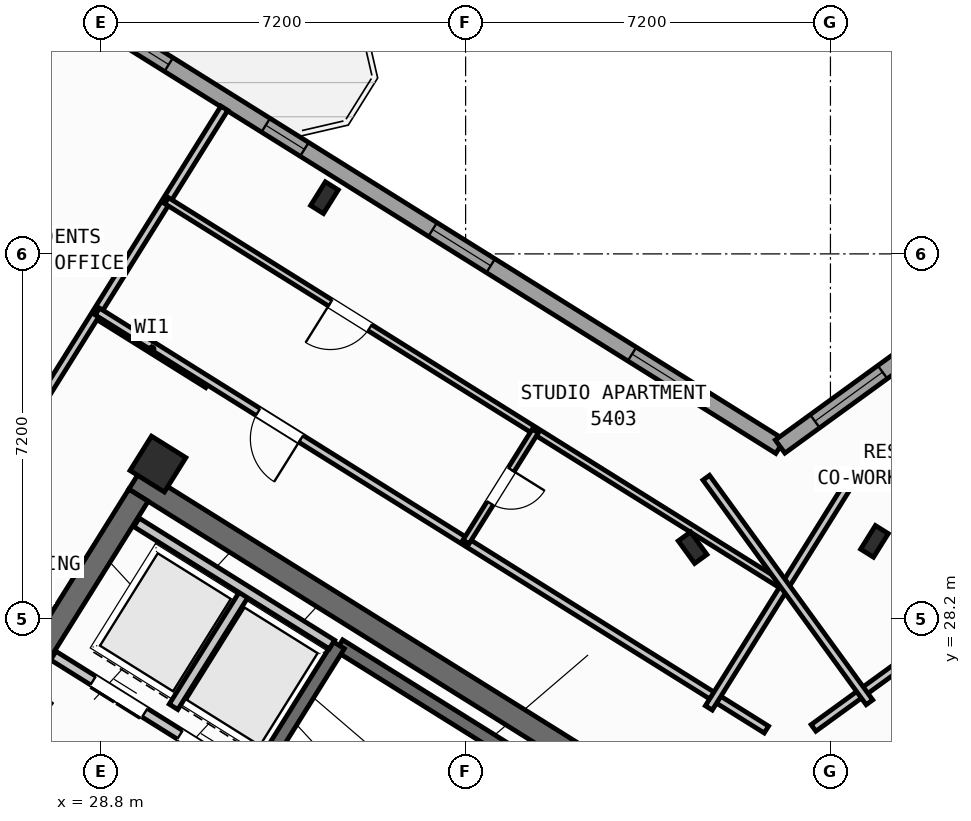
"""IFC4 building model, lengths in metres.
Left out: names, types, materials, properties, quantities, classifications, styles, units other than length and angle.
Written with IfcOpenShell. Run it as: python <this file> out.ifc"""

import sys

from ifc_helpers import new_model, si_unit, direction, frame, frame_2d, origin, origin_2d, place, context, subcontext, project, spatial, rectangle, hollow_rectangle, i_section, extrude, source, transform, mapped, element, fill, save


model = new_model("IFC4")
c1 = context("Model", 3, precision=1e-05, world=origin(), true_north=direction((0.0, 1.0)))
c2 = subcontext(c1, "Body", "Model", "MODEL_VIEW")
j1 = project(units=[si_unit("LENGTHUNIT", "METRE"), si_unit("PLANEANGLEUNIT", "RADIAN")], contexts=[c1])
p1 = place(None, origin())
s1 = spatial("IfcSite", under=j1, at=p1, CompositionType="ELEMENT")
p2 = place(p1, origin())
s2 = spatial("IfcBuilding", under=s1, at=p2, CompositionType="ELEMENT")
p3 = place(p2, frame((0.0, 0.0, 214.8)))
s3 = spatial("IfcBuildingStorey", under=s2, at=p3, CompositionType="ELEMENT", Elevation=214.8)
p4 = place(p3, frame((40.531, 24.036, 0.0), z_axis=(0.0, 0.0, 1.0), x_axis=(-0.848048787466, 0.529918157905, 0.0)))
e1 = element("IfcWall", 1, at=p4, inside=s3, PredefinedType="SHEAR", context=c2, shape_type="SweptSolid", body=[
    extrude(rectangle(XDim=13.04, YDim=0.45, at=frame_2d((6.52, 0.0))), origin(), (0.0, 0.0, 1.0), 3.35),
])
p5 = place(p3, frame((29.544, 30.636, 0.0), z_axis=(0.0, 0.0, 1.0), x_axis=(-0.529902075036, -0.848058836916, 0.0)))
e2 = element("IfcWall", 2, at=p5, inside=s3, PredefinedType="SHEAR", context=c2, shape_type="SweptSolid", body=[
    extrude(rectangle(XDim=3.625, YDim=0.45, at=frame_2d((1.812, 0.0))), origin(), (0.0, 0.0, 1.0), 3.35),
])
p6 = place(p3, frame((44.406, 24.172, 0.0), z_axis=(0.0, 0.0, 1.0), x_axis=(0.809012867805, 0.587790931986, 0.0)))
e3 = element("IfcWall", 3, at=p6, inside=s3, PredefinedType="SHEAR", context=c2, shape_type="SweptSolid", body=[
    extrude(rectangle(XDim=12.24, YDim=0.45, at=frame_2d((6.12, 0.0))), origin(), (0.0, 0.0, 1.0), 3.35),
])
m1 = source(origin(), c2, "Body", "SweptSolid", [
    extrude(i_section(OverallWidth=0.3, OverallDepth=0.55, WebThickness=0.015, FlangeThickness=0.029, at=origin_2d()), origin(), (0.0, 0.0, 1.0), 3.6),
])
for number, where, z_axis, x_axis in (
    (4, (44.068, 29.726, 0.0), (0.0, 0.0, 1.0), (-0.848, 0.53, 0.0)),
    (5, (33.213, 36.509, 0.0), (0.0, 0.0, 1.0), (-0.848, 0.53, 0.0)),
):
    element("IfcColumn", number, at=place(p3, frame(where, z_axis=z_axis, x_axis=x_axis)), inside=s3, PredefinedType="COLUMN", context=c2, shape_type="MappedRepresentation", body=[
        mapped(m1, transform((0.0, 0.0, 0.0), scale=1.0)),
    ])
m2 = source(origin(), c2, "Body", "SweptSolid", [
    extrude(hollow_rectangle(XDim=0.8, YDim=0.8, WallThickness=0.032, at=origin_2d()), origin(), (0.0, 0.0, 1.0), 3.6),
])
p7 = place(p3, frame((29.928, 31.251, 0.0), z_axis=(0.0, 0.0, 1.0), x_axis=(-0.848048096156, 0.529919264233, 0.0)))
e6 = element("IfcColumn", 6, at=p7, inside=s3, PredefinedType="COLUMN", context=c2, shape_type="MappedRepresentation", body=[
    mapped(m2, transform((0.0, 0.0, 0.0), scale=1.0)),
])
p8 = place(p3, frame((40.479, 29.601, 0.0), z_axis=(0.0, 0.0, 1.0), x_axis=(0.809016994375, 0.587785252292, 0.0)))
e7 = element("IfcColumn", 7, at=p8, inside=s3, PredefinedType="COLUMN", context=c2, shape_type="MappedRepresentation", body=[
    mapped(m1, transform((0.0, 0.0, 0.0), scale=1.0)),
])
p9 = place(p3, frame((31.76, 12.183, 0.0), z_axis=(0.0, 0.0, 1.0), x_axis=(-0.848047074256, 0.529920899612, 0.0)))
e8 = element("IfcWall", 8, at=p9, inside=s3, PredefinedType="STANDARD", context=c2, shape_type="SweptSolid", body=[
    extrude(rectangle(XDim=30.652, YDim=0.32, at=frame_2d((15.326, 0.0))), origin(), (0.0, 0.0, 1.0), 3.35),
])
p10 = place(p9, frame((15.166, 0.0, 0.0)))
e9 = element("IfcOpeningElement", 9, at=p10, cuts=e8, PredefinedType="OPENING", context=c2, shape_type="SweptSolid", body=[
    extrude(rectangle(XDim=1.2, YDim=2.15, at=frame_2d((0.6, 1.075))), frame((0.0, 0.17, 0.0), z_axis=(0.0, -1.0, 0.0), x_axis=(1.0, 0.0, 0.0)), (0.0, 0.0, 1.0), 0.34),
])
p11 = place(p9, frame((2.24, 0.0, 0.9)))
e10 = element("IfcOpeningElement", 10, at=p11, cuts=e8, PredefinedType="OPENING", context=c2, shape_type="SweptSolid", body=[
    extrude(rectangle(XDim=1.65, YDim=1.45, at=frame_2d((0.825, 0.725))), frame((0.0, 0.17, 0.0), z_axis=(0.0, -1.0, 0.0), x_axis=(1.0, 0.0, 0.0)), (0.0, 0.0, 1.0), 0.34),
])
p12 = place(p9, frame((7.469, 0.0, 0.9)))
e11 = element("IfcOpeningElement", 11, at=p12, cuts=e8, PredefinedType="OPENING", context=c2, shape_type="SweptSolid", body=[
    extrude(rectangle(XDim=1.65, YDim=1.45, at=frame_2d((0.825, 0.725))), frame((0.0, 0.17, 0.0), z_axis=(0.0, -1.0, 0.0), x_axis=(1.0, 0.0, 0.0)), (0.0, 0.0, 1.0), 0.34),
])
p13 = place(p9, frame((12.623, 0.0, 1.0)))
e12 = element("IfcOpeningElement", 12, at=p13, cuts=e8, PredefinedType="OPENING", context=c2, shape_type="SweptSolid", body=[
    extrude(rectangle(XDim=0.9, YDim=1.25, at=frame_2d((0.45, 0.625))), frame((0.0, 0.17, 0.0), z_axis=(0.0, -1.0, 0.0), x_axis=(1.0, 0.0, 0.0)), (0.0, 0.0, 1.0), 0.34),
])
p14 = place(p9, frame((19.715, 0.0, 1.0)))
e13 = element("IfcOpeningElement", 13, at=p14, cuts=e8, PredefinedType="OPENING", context=c2, shape_type="SweptSolid", body=[
    extrude(rectangle(XDim=0.9, YDim=1.25, at=frame_2d((0.45, 0.625))), frame((0.0, 0.17, 0.0), z_axis=(0.0, -1.0, 0.0), x_axis=(1.0, 0.0, 0.0)), (0.0, 0.0, 1.0), 0.34),
])
p15 = place(p9, frame((25.566, 0.0, 0.9)))
e14 = element("IfcOpeningElement", 14, at=p15, cuts=e8, PredefinedType="OPENING", context=c2, shape_type="SweptSolid", body=[
    extrude(rectangle(XDim=1.65, YDim=1.45, at=frame_2d((0.825, 0.725))), frame((0.0, 0.17, 0.0), z_axis=(0.0, -1.0, 0.0), x_axis=(1.0, 0.0, 0.0)), (0.0, 0.0, 1.0), 0.34),
])
p16 = place(p9, frame((28.896, 0.0, 1.0)))
e15 = element("IfcOpeningElement", 15, at=p16, cuts=e8, PredefinedType="OPENING", context=c2, shape_type="SweptSolid", body=[
    extrude(rectangle(XDim=0.9, YDim=1.25, at=frame_2d((0.45, 0.625))), frame((0.0, 0.17, 0.0), z_axis=(0.0, -1.0, 0.0), x_axis=(1.0, 0.0, 0.0)), (0.0, 0.0, 1.0), 0.34),
])
p17 = place(p3, frame((17.424, 47.083, 0.0), z_axis=(0.0, 0.0, 1.0), x_axis=(0.848049927979, -0.529916332693, 0.0)))
e16 = element("IfcWall", 16, at=p17, inside=s3, PredefinedType="STANDARD", context=c2, shape_type="SweptSolid", body=[
    extrude(rectangle(XDim=29.223, YDim=0.32, at=frame_2d((14.612, 0.0))), origin(), (0.0, 0.0, 1.0), 3.35),
])
p18 = place(p17, frame((2.526, 0.0, 0.0)))
e17 = element("IfcOpeningElement", 17, at=p18, cuts=e16, PredefinedType="OPENING", context=c2, shape_type="SweptSolid", body=[
    extrude(rectangle(XDim=1.05, YDim=2.15, at=frame_2d((0.525, 1.075))), frame((0.0, 0.17, 0.0), z_axis=(0.0, -1.0, 0.0), x_axis=(1.0, 0.0, 0.0)), (0.0, 0.0, 1.0), 0.34),
])
p19 = place(p17, frame((0.653, 0.0, 0.9)))
e18 = element("IfcOpeningElement", 18, at=p19, cuts=e16, PredefinedType="OPENING", context=c2, shape_type="SweptSolid", body=[
    extrude(rectangle(XDim=1.35, YDim=1.45, at=frame_2d((0.675, 0.725))), frame((0.0, 0.17, 0.0), z_axis=(0.0, -1.0, 0.0), x_axis=(1.0, 0.0, 0.0)), (0.0, 0.0, 1.0), 0.34),
])
p20 = place(p17, frame((6.897, 0.0, 1.0)))
e19 = element("IfcOpeningElement", 19, at=p20, cuts=e16, PredefinedType="OPENING", context=c2, shape_type="SweptSolid", body=[
    extrude(rectangle(XDim=0.9, YDim=1.25, at=frame_2d((0.45, 0.625))), frame((0.0, 0.17, 0.0), z_axis=(0.0, -1.0, 0.0), x_axis=(1.0, 0.0, 0.0)), (0.0, 0.0, 1.0), 0.34),
])
p21 = place(p17, frame((9.602, 0.0, 0.95)))
e20 = element("IfcOpeningElement", 20, at=p21, cuts=e16, PredefinedType="OPENING", context=c2, shape_type="SweptSolid", body=[
    extrude(rectangle(XDim=1.95, YDim=1.35, at=frame_2d((0.975, 0.675))), frame((0.0, 0.17, 0.0), z_axis=(0.0, -1.0, 0.0), x_axis=(1.0, 0.0, 0.0)), (0.0, 0.0, 1.0), 0.34),
])
p22 = place(p17, frame((14.096, 0.0, 1.0)))
e21 = element("IfcOpeningElement", 21, at=p22, cuts=e16, PredefinedType="OPENING", context=c2, shape_type="SweptSolid", body=[
    extrude(rectangle(XDim=0.9, YDim=1.25, at=frame_2d((0.45, 0.625))), frame((0.0, 0.17, 0.0), z_axis=(0.0, -1.0, 0.0), x_axis=(1.0, 0.0, 0.0)), (0.0, 0.0, 1.0), 0.34),
])
p23 = place(p17, frame((17.254, 0.0, 1.0)))
e22 = element("IfcOpeningElement", 22, at=p23, cuts=e16, PredefinedType="OPENING", context=c2, shape_type="SweptSolid", body=[
    extrude(rectangle(XDim=0.9, YDim=1.25, at=frame_2d((0.45, 0.625))), frame((0.0, 0.17, 0.0), z_axis=(0.0, -1.0, 0.0), x_axis=(1.0, 0.0, 0.0)), (0.0, 0.0, 1.0), 0.34),
])
p24 = place(p17, frame((21.139, 0.0, 0.9)))
e23 = element("IfcOpeningElement", 23, at=p24, cuts=e16, PredefinedType="OPENING", context=c2, shape_type="SweptSolid", body=[
    extrude(rectangle(XDim=1.35, YDim=1.45, at=frame_2d((0.675, 0.725))), frame((0.0, 0.17, 0.0), z_axis=(0.0, -1.0, 0.0), x_axis=(1.0, 0.0, 0.0)), (0.0, 0.0, 1.0), 0.34),
])
p25 = place(p17, frame((25.778, 0.0, 0.9)))
e24 = element("IfcOpeningElement", 24, at=p25, cuts=e16, PredefinedType="OPENING", context=c2, shape_type="SweptSolid", body=[
    extrude(rectangle(XDim=1.35, YDim=1.45, at=frame_2d((0.675, 0.725))), frame((0.0, 0.17, 0.0), z_axis=(0.0, -1.0, 0.0), x_axis=(1.0, 0.0, 0.0)), (0.0, 0.0, 1.0), 0.34),
])
p26 = place(p3, frame((42.207, 31.597, 0.0), z_axis=(0.0, 0.0, 1.0), x_axis=(0.809020333377, 0.587780656523, 0.0)))
e25 = element("IfcWall", 25, at=p26, inside=s3, PredefinedType="STANDARD", context=c2, shape_type="SweptSolid", body=[
    extrude(rectangle(XDim=15.223, YDim=0.32, at=frame_2d((7.611, 0.0))), origin(), (0.0, 0.0, 1.0), 3.35),
])
p27 = place(p26, frame((12.82, 0.0, 0.0)))
e26 = element("IfcOpeningElement", 26, at=p27, cuts=e25, PredefinedType="OPENING", context=c2, shape_type="SweptSolid", body=[
    extrude(rectangle(XDim=1.05, YDim=2.15, at=frame_2d((0.525, 1.075))), frame((0.0, 0.17, 0.0), z_axis=(0.0, -1.0, 0.0), x_axis=(1.0, 0.0, 0.0)), (0.0, 0.0, 1.0), 0.34),
])
p28 = place(p26, frame((0.85, 0.0, 0.9)))
e27 = element("IfcOpeningElement", 27, at=p28, cuts=e25, PredefinedType="OPENING", context=c2, shape_type="SweptSolid", body=[
    extrude(rectangle(XDim=1.65, YDim=1.45, at=frame_2d((0.825, 0.725))), frame((0.0, 0.17, 0.0), z_axis=(0.0, -1.0, 0.0), x_axis=(1.0, 0.0, 0.0)), (0.0, 0.0, 1.0), 0.34),
])
p29 = place(p26, frame((5.769, 0.0, 0.9)))
e28 = element("IfcOpeningElement", 28, at=p29, cuts=e25, PredefinedType="OPENING", context=c2, shape_type="SweptSolid", body=[
    extrude(rectangle(XDim=1.35, YDim=1.45, at=frame_2d((0.675, 0.725))), frame((0.0, 0.17, 0.0), z_axis=(0.0, -1.0, 0.0), x_axis=(1.0, 0.0, 0.0)), (0.0, 0.0, 1.0), 0.34),
])
p30 = place(p26, frame((10.219, 0.0, 1.0)))
e29 = element("IfcOpeningElement", 29, at=p30, cuts=e25, PredefinedType="OPENING", context=c2, shape_type="SweptSolid", body=[
    extrude(rectangle(XDim=0.9, YDim=1.25, at=frame_2d((0.45, 0.625))), frame((0.0, 0.17, 0.0), z_axis=(0.0, -1.0, 0.0), x_axis=(1.0, 0.0, 0.0)), (0.0, 0.0, 1.0), 0.34),
])
p31 = place(p3, frame((39.721, 23.788, 0.0), z_axis=(0.0, 0.0, 1.0), x_axis=(-0.848054434086, 0.529909121291, 0.0)))
e30 = element("IfcWall", 30, at=p31, inside=s3, PredefinedType="SHEAR", context=c2, shape_type="SweptSolid", body=[
    extrude(rectangle(XDim=7.33, YDim=0.26, at=frame_2d((3.665, 0.0))), origin(), (0.0, 0.0, 1.0), 3.35),
])
p32 = place(p3, frame((33.496, 27.677, 0.0), z_axis=(0.0, 0.0, 1.0), x_axis=(-0.529908658664, -0.84805472316, 0.0)))
e31 = element("IfcWall", 31, at=p32, inside=s3, PredefinedType="SHEAR", context=c2, shape_type="SweptSolid", body=[
    extrude(rectangle(XDim=3.16, YDim=0.26, at=frame_2d((1.58, 0.0))), origin(), (0.0, 0.0, 1.0), 3.35),
])
p33 = place(p3, frame((31.822, 24.998, 0.0), z_axis=(0.0, 0.0, 1.0), x_axis=(-0.848054125777, 0.529909614701, 0.0)))
e32 = element("IfcWall", 32, at=p33, inside=s3, PredefinedType="STANDARD", context=c2, shape_type="SweptSolid", body=[
    extrude(rectangle(XDim=4.668, YDim=0.2, at=frame_2d((2.334, 0.0))), origin(), (0.0, 0.0, 1.0), 3.34),
])
p34 = place(p33, frame((0.52, 0.0, 0.0)))
e33 = element("IfcOpeningElement", 33, at=p34, cuts=e32, PredefinedType="OPENING", context=c2, shape_type="SweptSolid", body=[
    extrude(rectangle(XDim=1.2, YDim=2.15, at=frame_2d((0.6, 1.075))), frame((0.0, 0.11, 0.0), z_axis=(0.0, -1.0, 0.0), x_axis=(1.0, 0.0, 0.0)), (0.0, 0.0, 1.0), 0.22),
])
p35 = place(p33, frame((2.54, 0.0, 0.0)))
e34 = element("IfcOpeningElement", 34, at=p35, cuts=e32, PredefinedType="OPENING", context=c2, shape_type="SweptSolid", body=[
    extrude(rectangle(XDim=1.2, YDim=2.15, at=frame_2d((0.6, 1.075))), frame((0.0, 0.11, 0.0), z_axis=(0.0, -1.0, 0.0), x_axis=(1.0, 0.0, 0.0)), (0.0, 0.0, 1.0), 0.22),
])
p36 = place(p3, frame((31.645, 28.716, 0.0), z_axis=(0.0, 0.0, 1.0), x_axis=(-0.52986693015, -0.848080795876, 0.0)))
e35 = element("IfcWall", 35, at=p36, inside=s3, PredefinedType="STANDARD", context=c2, shape_type="SweptSolid", body=[
    extrude(rectangle(XDim=2.66, YDim=0.2, at=frame_2d((1.33, 0.0))), origin(), (0.0, 0.0, 1.0), 3.34),
])
p37 = place(p3, frame((33.363, 27.69, 0.0), z_axis=(0.0, 0.0, 1.0), x_axis=(-0.84804957148, 0.529916903215, 0.0)))
e36 = element("IfcWall", 36, at=p37, inside=s3, PredefinedType="STANDARD", context=c2, shape_type="SweptSolid", body=[
    extrude(rectangle(XDim=4.548, YDim=0.2, at=frame_2d((2.274, 0.0))), origin(), (0.0, 0.0, 1.0), 3.34),
])
p38 = place(p3, frame((30.914, 32.829, 0.0), z_axis=(0.0, 0.0, 1.0), x_axis=(-0.848008813643, 0.529982124211, 0.0)))
e37 = element("IfcWall", 37, at=p38, inside=s3, PredefinedType="PARTITIONING", context=c2, shape_type="SweptSolid", body=[
    extrude(rectangle(XDim=2.61, YDim=0.16, at=frame_2d((1.305, 0.0))), origin(), (0.0, 0.0, 1.0), 3.34),
])
p39 = place(p3, frame((31.239, 38.274, 0.0), z_axis=(0.0, 0.0, 1.0), x_axis=(-0.529925472745, -0.848044216616, 0.0)))
e38 = element("IfcWall", 38, at=p39, inside=s3, PredefinedType="PARTITIONING", context=c2, shape_type="SweptSolid", body=[
    extrude(rectangle(XDim=11.65, YDim=0.16, at=frame_2d((5.825, 0.0))), origin(), (0.0, 0.0, 1.0), 3.34),
])
p40 = place(p3, frame((41.936, 26.012, 0.0), z_axis=(0.0, 0.0, 1.0), x_axis=(-0.848051154596, 0.529914369676, 0.0)))
e39 = element("IfcWall", 39, at=p40, inside=s3, PredefinedType="PARTITIONING", context=c2, shape_type="SweptSolid", body=[
    extrude(rectangle(XDim=15.57, YDim=0.16, at=frame_2d((7.785, 0.0))), origin(), (0.0, 0.0, 1.0), 3.34),
])
p41 = place(p40, frame((10.83, 0.0, 0.0)))
e40 = element("IfcOpeningElement", 40, at=p41, cuts=e39, PredefinedType="OPENING", context=c2, shape_type="SweptSolid", body=[
    extrude(rectangle(XDim=1.0, YDim=2.1, at=frame_2d((0.5, 1.05))), frame((0.0, 0.09, 0.0), z_axis=(0.0, -1.0, 0.0), x_axis=(1.0, 0.0, 0.0)), (0.0, 0.0, 1.0), 0.18),
])
p42 = place(p3, frame((43.704, 31.086, 0.0), z_axis=(0.0, 0.0, 1.0), x_axis=(-0.529906828443, -0.848055866774, 0.0)))
e41 = element("IfcWall", 41, at=p42, inside=s3, PredefinedType="PARTITIONING", context=c2, shape_type="SweptSolid", body=[
    extrude(rectangle(XDim=5.48, YDim=0.16, at=frame_2d((2.74, 0.0))), origin(), (0.0, 0.0, 1.0), 3.34),
])
p43 = place(p3, frame((42.226, 28.873, 0.0), z_axis=(0.0, 0.0, 1.0), x_axis=(-0.848049134363, 0.529917602752, 0.0)))
e42 = element("IfcWall", 42, at=p43, inside=s3, PredefinedType="PLUMBINGWALL", context=c2, shape_type="SweptSolid", body=[
    extrude(rectangle(XDim=14.3, YDim=0.14, at=frame_2d((7.15, 0.0))), origin(), (0.0, 0.0, 1.0), 3.34),
])
p44 = place(p43, frame((9.57, 0.0, 0.0)))
e43 = element("IfcOpeningElement", 43, at=p44, cuts=e42, PredefinedType="OPENING", context=c2, shape_type="SweptSolid", body=[
    extrude(rectangle(XDim=0.92, YDim=2.08, at=frame_2d((0.46, 1.04))), frame((0.0, 0.08, 0.0), z_axis=(0.0, -1.0, 0.0), x_axis=(1.0, 0.0, 0.0)), (0.0, 0.0, 1.0), 0.16),
])
p45 = place(p3, frame((37.375, 31.904, 0.0), z_axis=(0.0, 0.0, 1.0), x_axis=(-0.529913878929, -0.848051461244, 0.0)))
e44 = element("IfcWall", 44, at=p45, inside=s3, PredefinedType="PLUMBINGWALL", context=c2, shape_type="SweptSolid", body=[
    extrude(rectangle(XDim=2.58, YDim=0.14, at=frame_2d((1.29, 0.0))), origin(), (0.0, 0.0, 1.0), 3.34),
])
p46 = place(p45, frame((0.9, 0.0, 0.0)))
e45 = element("IfcOpeningElement", 45, at=p46, cuts=e44, PredefinedType="OPENING", context=c2, shape_type="SweptSolid", body=[
    extrude(rectangle(XDim=0.78, YDim=2.05, at=frame_2d((0.39, 1.025))), frame((0.0, 0.08, 0.0), z_axis=(0.0, -1.0, 0.0), x_axis=(1.0, 0.0, 0.0)), (0.0, 0.0, 1.0), 0.16),
])
p47 = place(p3, frame((42.866, 26.044, 0.0), z_axis=(0.0, 0.0, 1.0), x_axis=(0.809020254154, 0.587780765566, 0.0)))
e46 = element("IfcWall", 46, at=p47, inside=s3, PredefinedType="PARTITIONING", context=c2, shape_type="SweptSolid", body=[
    extrude(rectangle(XDim=14.67, YDim=0.16, at=frame_2d((7.335, 0.0))), origin(), (0.0, 0.0, 1.0), 3.34),
])
p48 = place(p47, frame((3.215, 0.0, 0.0)))
e47 = element("IfcOpeningElement", 47, at=p48, cuts=e46, PredefinedType="OPENING", context=c2, shape_type="SweptSolid", body=[
    extrude(rectangle(XDim=1.0, YDim=2.1, at=frame_2d((0.5, 1.05))), frame((0.0, 0.09, 0.0), z_axis=(0.0, -1.0, 0.0), x_axis=(1.0, 0.0, 0.0)), (0.0, 0.0, 1.0), 0.18),
])
p49 = place(p47, frame((9.915, 0.0, 0.0)))
e48 = element("IfcOpeningElement", 48, at=p49, cuts=e46, PredefinedType="OPENING", context=c2, shape_type="SweptSolid", body=[
    extrude(rectangle(XDim=1.0, YDim=2.1, at=frame_2d((0.5, 1.05))), frame((0.0, 0.09, 0.0), z_axis=(0.0, -1.0, 0.0), x_axis=(1.0, 0.0, 0.0)), (0.0, 0.0, 1.0), 0.18),
])
p50 = place(p3, frame((43.969, 26.55, 0.0), z_axis=(0.0, 0.0, 1.0), x_axis=(-0.587776919386, 0.80902304852, 0.0)))
e49 = element("IfcWall", 49, at=p50, inside=s3, PredefinedType="PARTITIONING", context=c2, shape_type="SweptSolid", body=[
    extrude(rectangle(XDim=5.48, YDim=0.16, at=frame_2d((2.74, 0.0))), origin(), (0.0, 0.0, 1.0), 3.34),
])
m3 = source(origin(), c2, "Body", "SweptSolid", [
    extrude(rectangle(XDim=0.9, YDim=1.25, at=frame_2d((0.45, 0.625))), frame((0.0, 0.03, 0.0), z_axis=(0.0, -1.0, 0.0), x_axis=(1.0, 0.0, 0.0)), (0.0, 0.0, 1.0), 0.06),
])
p51 = place(p22, origin())
e50 = element("IfcWindow", 50, at=p51, inside=s3, PartitioningType="SINGLE_PANEL", PredefinedType="WINDOW", context=c2, shape_type="MappedRepresentation", body=[
    mapped(m3, transform((0.0, 0.0, 0.0), scale=1.0)),
])
fill(e21, e50)
p52 = place(p23, origin())
e51 = element("IfcWindow", 51, at=p52, inside=s3, PartitioningType="SINGLE_PANEL", PredefinedType="WINDOW", context=c2, shape_type="MappedRepresentation", body=[
    mapped(m3, transform((0.0, 0.0, 0.0), scale=1.0)),
])
fill(e22, e51)
m4 = source(origin(), c2, "Body", "SweptSolid", [
    extrude(rectangle(XDim=1.35, YDim=1.45, at=frame_2d((0.675, 0.725))), frame((0.0, 0.03, 0.0), z_axis=(0.0, -1.0, 0.0), x_axis=(1.0, 0.0, 0.0)), (0.0, 0.0, 1.0), 0.06),
])
p53 = place(p24, origin())
e52 = element("IfcWindow", 52, at=p53, inside=s3, PartitioningType="SINGLE_PANEL", PredefinedType="WINDOW", context=c2, shape_type="MappedRepresentation", body=[
    mapped(m4, transform((0.0, 0.0, 0.0), scale=1.0)),
])
fill(e23, e52)
p54 = place(p25, origin())
e53 = element("IfcWindow", 53, at=p54, inside=s3, PartitioningType="SINGLE_PANEL", PredefinedType="WINDOW", context=c2, shape_type="MappedRepresentation", body=[
    mapped(m4, transform((0.0, 0.0, 0.0), scale=1.0)),
])
fill(e24, e53)
m5 = source(origin(), c2, "Body", "SweptSolid", [
    extrude(rectangle(XDim=1.65, YDim=1.45, at=frame_2d((0.825, 0.725))), frame((0.0, 0.03, 0.0), z_axis=(0.0, -1.0, 0.0), x_axis=(1.0, 0.0, 0.0)), (0.0, 0.0, 1.0), 0.06),
])
p55 = place(p28, origin())
e54 = element("IfcWindow", 54, at=p55, inside=s3, PartitioningType="SINGLE_PANEL", PredefinedType="WINDOW", context=c2, shape_type="MappedRepresentation", body=[
    mapped(m5, transform((0.0, 0.0, 0.0), scale=1.0)),
])
fill(e27, e54)
m6 = source(origin(), c2, "Body", "SweptSolid", [
    extrude(rectangle(XDim=1.2, YDim=2.15, at=frame_2d((0.6, 1.075))), frame((0.0, 0.025, 0.0), z_axis=(0.0, -1.0, 0.0), x_axis=(1.0, 0.0, 0.0)), (0.0, 0.0, 1.0), 0.05),
])
p56 = place(p34, origin())
e55 = element("IfcDoor", 55, at=p56, inside=s3, OperationType="DOUBLE_DOOR_SLIDING", PredefinedType="DOOR", context=c2, shape_type="MappedRepresentation", body=[
    mapped(m6, transform((0.0, 0.0, 0.0), scale=1.0)),
])
fill(e33, e55)
p57 = place(p35, origin())
e56 = element("IfcDoor", 56, at=p57, inside=s3, OperationType="DOUBLE_DOOR_SLIDING", PredefinedType="DOOR", context=c2, shape_type="MappedRepresentation", body=[
    mapped(m6, transform((0.0, 0.0, 0.0), scale=1.0)),
])
fill(e34, e56)
m7 = source(origin(), c2, "Body", "SweptSolid", [
    extrude(rectangle(XDim=1.0, YDim=2.1, at=frame_2d((0.5, 1.05))), frame((0.0, 0.025, 0.0), z_axis=(0.0, -1.0, 0.0), x_axis=(1.0, 0.0, 0.0)), (0.0, 0.0, 1.0), 0.05),
])
p58 = place(p41, origin())
e57 = element("IfcDoor", 57, at=p58, inside=s3, OperationType="SINGLE_SWING_LEFT", PredefinedType="DOOR", context=c2, shape_type="MappedRepresentation", body=[
    mapped(m7, transform((0.0, 0.0, 0.0), scale=1.0)),
])
fill(e40, e57)
m8 = source(origin(), c2, "Body", "SweptSolid", [
    extrude(rectangle(XDim=0.92, YDim=2.08, at=frame_2d((0.46, 1.04))), frame((0.0, 0.025, 0.0), z_axis=(0.0, -1.0, 0.0), x_axis=(1.0, 0.0, 0.0)), (0.0, 0.0, 1.0), 0.05),
])
p59 = place(p44, origin())
e58 = element("IfcDoor", 58, at=p59, inside=s3, OperationType="SINGLE_SWING_RIGHT", PredefinedType="DOOR", context=c2, shape_type="MappedRepresentation", body=[
    mapped(m8, transform((0.0, 0.0, 0.0), scale=1.0)),
])
fill(e43, e58)
m9 = source(origin(), c2, "Body", "SweptSolid", [
    extrude(rectangle(XDim=0.78, YDim=2.05, at=frame_2d((0.39, 1.025))), frame((0.0, 0.025, 0.0), z_axis=(0.0, -1.0, 0.0), x_axis=(1.0, 0.0, 0.0)), (0.0, 0.0, 1.0), 0.05),
])
p60 = place(p46, origin())
e59 = element("IfcDoor", 59, at=p60, inside=s3, OperationType="SINGLE_SWING_LEFT", PredefinedType="DOOR", context=c2, shape_type="MappedRepresentation", body=[
    mapped(m9, transform((0.0, 0.0, 0.0), scale=1.0)),
])
fill(e45, e59)
save(model, sys.argv[1])
